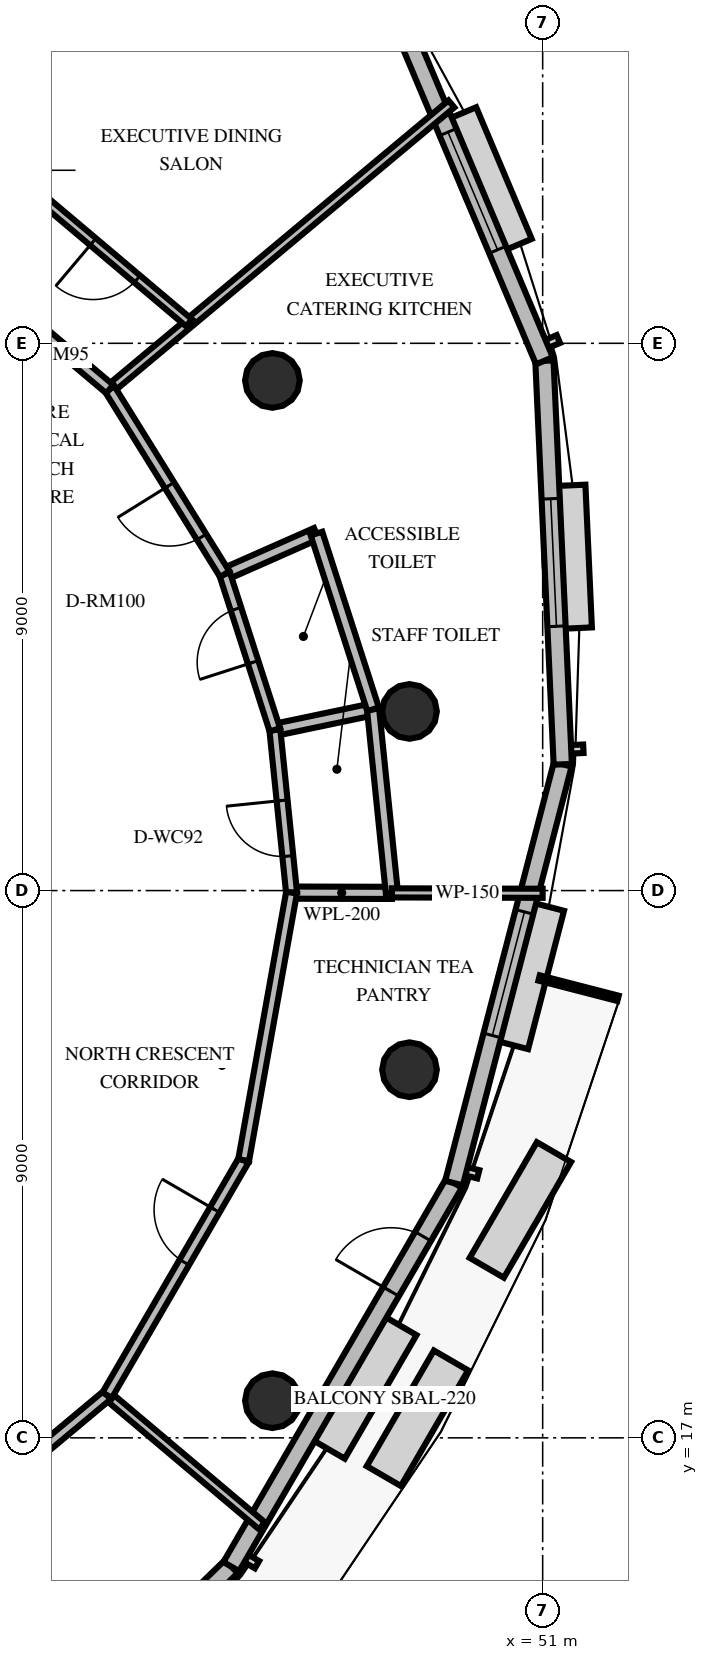
"""IFC4 building model, lengths in metres.
Left out: names, types, materials, properties, quantities, classifications, styles, units other than length and angle.
Written with IfcOpenShell. Run it as: python <this file> out.ifc"""

import sys

from ifc_helpers import new_model, si_unit, direction, frame, frame_2d, origin, origin_2d, place, context, subcontext, project, spatial, rectangle, circle, extrude, element, fill, save


model = new_model("IFC4")
c1 = context("Model", 3, precision=1e-05, world=origin(), true_north=direction((0.0, 1.0)))
c2 = subcontext(c1, "Body", "Model", "MODEL_VIEW")
j1 = project(units=[si_unit("LENGTHUNIT", "METRE"), si_unit("PLANEANGLEUNIT", "RADIAN")], contexts=[c1])
p1 = place(None, origin())
s1 = spatial("IfcSite", under=j1, at=p1, CompositionType="ELEMENT")
p2 = place(p1, origin())
s2 = spatial("IfcBuilding", under=s1, at=p2, CompositionType="ELEMENT")
p3 = place(p2, frame((0.0, 0.0, 277.2)))
s3 = spatial("IfcBuildingStorey", under=s2, at=p3, CompositionType="ELEMENT", Elevation=277.2)
for number, where, z_axis, x_axis in (
    (1, (48.81, 28.946, 0.0), (0.0, 0.0, 1.0), (1.0, 0.0, 0.0)),
    (2, (46.555, 34.389, 0.0), (0.0, 0.0, 1.0), (1.0, 0.0, 0.0)),
    (3, (46.555, 17.611, 0.0), (0.0, 0.0, 1.0), (1.0, 0.0, 0.0)),
    (4, (48.81, 23.054, 0.0), (0.0, 0.0, 1.0), (1.0, 0.0, 0.0)),
):
    element("IfcColumn", number, at=place(p3, frame(where, z_axis=z_axis, x_axis=x_axis)), inside=s3, PredefinedType="COLUMN", context=c2, shape_type="SweptSolid", body=[
        extrude(circle(Radius=0.45, at=origin_2d()), origin(), (0.0, 0.0, 1.0), 3.6),
    ])
p4 = place(p3, frame((40.783, 9.917, 0.0), z_axis=(0.0, 0.0, 1.0), x_axis=(0.716208919205, 0.697885939142, 0.0)))
e5 = element("IfcWall", 5, at=p4, inside=s3, PredefinedType="SOLIDWALL", context=c2, shape_type="SweptSolid", body=[
    extrude(rectangle(XDim=7.115, YDim=0.3, at=frame_2d((3.558, 0.0))), origin(), (0.0, 0.0, 1.0), 2.76),
])
p5 = place(p4, frame((2.508, 0.0, 0.8)))
e6 = element("IfcOpeningElement", 6, at=p5, cuts=e5, PredefinedType="OPENING", context=c2, shape_type="SweptSolid", body=[
    extrude(rectangle(XDim=2.1, YDim=1.85, at=frame_2d((1.05, 0.925))), frame((0.0, 0.16, 0.0), z_axis=(0.0, -1.0, 0.0), x_axis=(1.0, 0.0, 0.0)), (0.0, 0.0, 1.0), 0.32),
])
p6 = place(p3, frame((45.879, 14.883, 0.0), z_axis=(0.0, 0.0, 1.0), x_axis=(0.502255031748, 0.864719540131, 0.0)))
e7 = element("IfcWall", 7, at=p6, inside=s3, PredefinedType="SOLIDWALL", context=c2, shape_type="SweptSolid", body=[
    extrude(rectangle(XDim=7.293, YDim=0.3, at=frame_2d((3.646, 0.0))), origin(), (0.0, 0.0, 1.0), 2.76),
])
p7 = place(p6, frame((5.23, 0.0, 0.0)))
e8 = element("IfcOpeningElement", 8, at=p7, cuts=e7, PredefinedType="OPENING", context=c2, shape_type="SweptSolid", body=[
    extrude(rectangle(XDim=1.05, YDim=2.15, at=frame_2d((0.525, 1.075))), frame((0.0, 0.16, 0.0), z_axis=(0.0, -1.0, 0.0), x_axis=(1.0, 0.0, 0.0)), (0.0, 0.0, 1.0), 0.32),
])
p8 = place(p3, frame((49.542, 21.19, 0.0), z_axis=(0.0, 0.0, 1.0), x_axis=(0.251374151945, 0.967889991546, 0.0)))
e9 = element("IfcWall", 9, at=p8, inside=s3, PredefinedType="SOLIDWALL", context=c2, shape_type="SweptSolid", body=[
    extrude(rectangle(XDim=7.115, YDim=0.3, at=frame_2d((3.558, 0.0))), origin(), (0.0, 0.0, 1.0), 2.76),
])
p9 = place(p8, frame((2.508, 0.0, 0.8)))
e10 = element("IfcOpeningElement", 10, at=p9, cuts=e9, PredefinedType="OPENING", context=c2, shape_type="SweptSolid", body=[
    extrude(rectangle(XDim=2.1, YDim=1.85, at=frame_2d((1.05, 0.925))), frame((0.0, 0.16, 0.0), z_axis=(0.0, -1.0, 0.0), x_axis=(1.0, 0.0, 0.0)), (0.0, 0.0, 1.0), 0.32),
])
p10 = place(p3, frame((51.331, 28.076, 0.0), z_axis=(0.0, 0.0, 1.0), x_axis=(-0.045424331504, 0.998967782317, 0.0)))
e11 = element("IfcWall", 11, at=p10, inside=s3, PredefinedType="SOLIDWALL", context=c2, shape_type="SweptSolid", body=[
    extrude(rectangle(XDim=6.643, YDim=0.3, at=frame_2d((3.322, 0.0))), origin(), (0.0, 0.0, 1.0), 2.76),
])
p11 = place(p10, frame((2.272, 0.0, 0.8)))
e12 = element("IfcOpeningElement", 12, at=p11, cuts=e11, PredefinedType="OPENING", context=c2, shape_type="SweptSolid", body=[
    extrude(rectangle(XDim=2.1, YDim=1.85, at=frame_2d((1.05, 0.925))), frame((0.0, 0.16, 0.0), z_axis=(0.0, -1.0, 0.0), x_axis=(1.0, 0.0, 0.0)), (0.0, 0.0, 1.0), 0.32),
])
p12 = place(p3, frame((51.029, 34.713, 0.0), z_axis=(0.0, 0.0, 1.0), x_axis=(-0.388609687406, 0.921402469529, 0.0)))
e13 = element("IfcWall", 13, at=p12, inside=s3, PredefinedType="SOLIDWALL", context=c2, shape_type="SweptSolid", body=[
    extrude(rectangle(XDim=6.062, YDim=0.3, at=frame_2d((3.031, 0.0))), origin(), (0.0, 0.0, 1.0), 2.76),
])
p13 = place(p12, frame((1.981, 0.0, 0.8)))
e14 = element("IfcOpeningElement", 14, at=p13, cuts=e13, PredefinedType="OPENING", context=c2, shape_type="SweptSolid", body=[
    extrude(rectangle(XDim=2.1, YDim=1.85, at=frame_2d((1.05, 0.925))), frame((0.0, 0.16, 0.0), z_axis=(0.0, -1.0, 0.0), x_axis=(1.0, 0.0, 0.0)), (0.0, 0.0, 1.0), 0.32),
])
p14 = place(p3, frame((46.87, 25.966, 0.0), z_axis=(0.0, 0.0, 1.0), x_axis=(0.999996452876, -0.002663500466, 0.0)))
e15 = element("IfcWall", 15, at=p14, inside=s3, PredefinedType="PLUMBINGWALL", context=c2, shape_type="SweptSolid", body=[
    extrude(rectangle(XDim=1.65, YDim=0.2, at=frame_2d((0.825, 0.0))), origin(), (0.0, 0.0, 1.0), 2.46),
])
p15 = place(p3, frame((46.596, 28.643, 0.0), z_axis=(0.0, 0.0, 1.0), x_axis=(0.978687703769, 0.20535427556, 0.0)))
e16 = element("IfcWall", 16, at=p15, inside=s3, PredefinedType="PLUMBINGWALL", context=c2, shape_type="SweptSolid", body=[
    extrude(rectangle(XDim=1.65, YDim=0.2, at=frame_2d((0.825, 0.0))), origin(), (0.0, 0.0, 1.0), 2.46),
])
p16 = place(p3, frame((48.52, 25.962, 0.0), z_axis=(0.0, 0.0, 1.0), x_axis=(-0.101900297464, 0.994794616681, 0.0)))
e17 = element("IfcWall", 17, at=p16, inside=s3, PredefinedType="PLUMBINGWALL", context=c2, shape_type="SweptSolid", body=[
    extrude(rectangle(XDim=3.036, YDim=0.2, at=frame_2d((1.518, 0.0))), origin(), (0.0, 0.0, 1.0), 2.46),
])
p17 = place(p3, frame((46.87, 25.966, 0.0), z_axis=(0.0, 0.0, 1.0), x_axis=(-0.101992026191, 0.994785216312, 0.0)))
e18 = element("IfcWall", 18, at=p17, inside=s3, PredefinedType="PARTITIONING", context=c2, shape_type="SweptSolid", body=[
    extrude(rectangle(XDim=2.69, YDim=0.18, at=frame_2d((1.345, 0.0))), origin(), (0.0, 0.0, 1.0), 2.46),
])
p18 = place(p17, frame((0.603, 0.0, 0.0)))
e19 = element("IfcOpeningElement", 19, at=p18, cuts=e18, PredefinedType="OPENING", context=c2, shape_type="SweptSolid", body=[
    extrude(rectangle(XDim=0.92, YDim=2.1, at=frame_2d((0.46, 1.05))), frame((0.0, 0.1, 0.0), z_axis=(0.0, -1.0, 0.0), x_axis=(1.0, 0.0, 0.0)), (0.0, 0.0, 1.0), 0.2),
])
p19 = place(p3, frame((45.771, 31.204, 0.0), z_axis=(0.0, 0.0, 1.0), x_axis=(0.914584805852, 0.404394155378, 0.0)))
e20 = element("IfcWall", 20, at=p19, inside=s3, PredefinedType="PLUMBINGWALL", context=c2, shape_type="SweptSolid", body=[
    extrude(rectangle(XDim=1.65, YDim=0.2, at=frame_2d((0.825, 0.0))), origin(), (0.0, 0.0, 1.0), 2.46),
])
p20 = place(p3, frame((48.211, 28.982, 0.0), z_axis=(0.0, 0.0, 1.0), x_axis=(-0.306584473664, 0.951843453782, 0.0)))
e21 = element("IfcWall", 21, at=p20, inside=s3, PredefinedType="PLUMBINGWALL", context=c2, shape_type="SweptSolid", body=[
    extrude(rectangle(XDim=3.036, YDim=0.2, at=frame_2d((1.518, 0.0))), origin(), (0.0, 0.0, 1.0), 2.46),
])
p21 = place(p3, frame((46.596, 28.643, 0.0), z_axis=(0.0, 0.0, 1.0), x_axis=(-0.306520218398, 0.951864147719, 0.0)))
e22 = element("IfcWall", 22, at=p21, inside=s3, PredefinedType="PARTITIONING", context=c2, shape_type="SweptSolid", body=[
    extrude(rectangle(XDim=2.69, YDim=0.18, at=frame_2d((1.345, 0.0))), origin(), (0.0, 0.0, 1.0), 2.46),
])
p22 = place(p21, frame((1.167, 0.0, 0.0)))
e23 = element("IfcOpeningElement", 23, at=p22, cuts=e22, PredefinedType="OPENING", context=c2, shape_type="SweptSolid", body=[
    extrude(rectangle(XDim=0.92, YDim=2.1, at=frame_2d((0.46, 1.05))), frame((0.0, 0.1, 0.0), z_axis=(0.0, -1.0, 0.0), x_axis=(1.0, 0.0, 0.0)), (0.0, 0.0, 1.0), 0.2),
])
p23 = place(p3, frame((48.52, 25.962, 0.0), z_axis=(0.0, 0.0, 1.0), x_axis=(0.9999967237, -0.002559802581, 0.0)))
e24 = element("IfcWall", 24, at=p23, inside=s3, PredefinedType="PARTITIONING", context=c2, shape_type="SweptSolid", body=[
    extrude(rectangle(XDim=2.48, YDim=0.15, at=frame_2d((1.24, 0.0))), origin(), (0.0, 0.0, 1.0), 2.46),
])
p24 = place(p3, frame((43.881, 34.247, 0.0), z_axis=(0.0, 0.0, 1.0), x_axis=(0.767720640374, 0.640784689536, 0.0)))
e25 = element("IfcWall", 25, at=p24, inside=s3, PredefinedType="PARTITIONING", context=c2, shape_type="SweptSolid", body=[
    extrude(rectangle(XDim=7.318, YDim=0.15, at=frame_2d((3.659, 0.0))), origin(), (0.0, 0.0, 1.0), 2.46),
])
p25 = place(p3, frame((45.771, 31.204, 0.0), z_axis=(0.0, 0.0, 1.0), x_axis=(-0.527693632299, 0.849434771145, 0.0)))
e26 = element("IfcWall", 26, at=p25, inside=s3, PredefinedType="PARTITIONING", context=c2, shape_type="SweptSolid", body=[
    extrude(rectangle(XDim=3.582, YDim=0.18, at=frame_2d((1.791, 0.0))), origin(), (0.0, 0.0, 1.0), 2.46),
])
p26 = place(p25, frame((0.721, 0.0, 0.0)))
e27 = element("IfcOpeningElement", 27, at=p26, cuts=e26, PredefinedType="OPENING", context=c2, shape_type="SweptSolid", body=[
    extrude(rectangle(XDim=1.0, YDim=2.15, at=frame_2d((0.5, 1.075))), frame((0.0, 0.1, 0.0), z_axis=(0.0, -1.0, 0.0), x_axis=(1.0, 0.0, 0.0)), (0.0, 0.0, 1.0), 0.2),
])
p27 = place(p3, frame((43.881, 34.247, 0.0), z_axis=(0.0, 0.0, 1.0), x_axis=(-0.764357098744, 0.644793164976, 0.0)))
e28 = element("IfcWall", 28, at=p27, inside=s3, PredefinedType="PARTITIONING", context=c2, shape_type="SweptSolid", body=[
    extrude(rectangle(XDim=4.47, YDim=0.18, at=frame_2d((2.235, 0.0))), origin(), (0.0, 0.0, 1.0), 2.46),
])
p28 = place(p3, frame((45.186, 35.336, 0.0), z_axis=(0.0, 0.0, 1.0), x_axis=(-0.764355389284, 0.644795191415, 0.0)))
e29 = element("IfcWall", 29, at=p28, inside=s3, PredefinedType="PARTITIONING", context=c2, shape_type="SweptSolid", body=[
    extrude(rectangle(XDim=5.06, YDim=0.15, at=frame_2d((2.53, 0.0))), origin(), (0.0, 0.0, 1.0), 2.46),
])
p29 = place(p28, frame((1.117, 0.0, 0.0)))
e30 = element("IfcOpeningElement", 30, at=p29, cuts=e29, PredefinedType="OPENING", context=c2, shape_type="SweptSolid", body=[
    extrude(rectangle(XDim=0.95, YDim=2.15, at=frame_2d((0.475, 1.075))), frame((0.0, 0.085, 0.0), z_axis=(0.0, -1.0, 0.0), x_axis=(1.0, 0.0, 0.0)), (0.0, 0.0, 1.0), 0.17),
])
p30 = place(p3, frame((43.837, 17.701, 0.0), z_axis=(0.0, 0.0, 1.0), x_axis=(0.764350185537, -0.644801360009, 0.0)))
e31 = element("IfcWall", 31, at=p30, inside=s3, PredefinedType="PARTITIONING", context=c2, shape_type="SweptSolid", body=[
    extrude(rectangle(XDim=3.331, YDim=0.15, at=frame_2d((1.666, 0.0))), origin(), (0.0, 0.0, 1.0), 2.46),
])
p31 = place(p3, frame((40.406, 14.837, 0.0), z_axis=(0.0, 0.0, 1.0), x_axis=(0.767746496496, 0.640753710187, 0.0)))
e32 = element("IfcWall", 32, at=p31, inside=s3, PredefinedType="PARTITIONING", context=c2, shape_type="SweptSolid", body=[
    extrude(rectangle(XDim=4.47, YDim=0.18, at=frame_2d((2.235, 0.0))), origin(), (0.0, 0.0, 1.0), 2.46),
])
p32 = place(p3, frame((43.837, 17.701, 0.0), z_axis=(0.0, 0.0, 1.0), x_axis=(0.502226433787, 0.864736150051, 0.0)))
e33 = element("IfcWall", 33, at=p32, inside=s3, PredefinedType="PARTITIONING", context=c2, shape_type="SweptSolid", body=[
    extrude(rectangle(XDim=4.47, YDim=0.18, at=frame_2d((2.235, 0.0))), origin(), (0.0, 0.0, 1.0), 2.46),
])
p33 = place(p32, frame((2.527, 0.0, 0.0)))
e34 = element("IfcOpeningElement", 34, at=p33, cuts=e33, PredefinedType="OPENING", context=c2, shape_type="SweptSolid", body=[
    extrude(rectangle(XDim=1.0, YDim=2.15, at=frame_2d((0.5, 1.075))), frame((0.0, 0.1, 0.0), z_axis=(0.0, -1.0, 0.0), x_axis=(1.0, 0.0, 0.0)), (0.0, 0.0, 1.0), 0.2),
])
p34 = place(p3, frame((46.082, 21.567, 0.0), z_axis=(0.0, 0.0, 1.0), x_axis=(0.176265133865, 0.98434272618, 0.0)))
e35 = element("IfcWall", 35, at=p34, inside=s3, PredefinedType="PARTITIONING", context=c2, shape_type="SweptSolid", body=[
    extrude(rectangle(XDim=4.47, YDim=0.18, at=frame_2d((2.235, 0.0))), origin(), (0.0, 0.0, 1.0), 2.46),
])
p35 = place(p7, origin())
e36 = element("IfcDoor", 36, at=p35, inside=s3, OperationType="SINGLE_SWING_LEFT", PredefinedType="DOOR", context=c2, shape_type="SweptSolid", body=[
    extrude(rectangle(XDim=1.05, YDim=2.15, at=frame_2d((0.525, 1.075))), frame((0.0, 0.025, 0.0), z_axis=(0.0, -1.0, 0.0), x_axis=(1.0, 0.0, 0.0)), (0.0, 0.0, 1.0), 0.05),
])
fill(e8, e36)
p36 = place(p9, origin())
e37 = element("IfcWindow", 37, at=p36, inside=s3, PartitioningType="SINGLE_PANEL", PredefinedType="WINDOW", context=c2, shape_type="SweptSolid", body=[
    extrude(rectangle(XDim=2.1, YDim=1.85, at=frame_2d((1.05, 0.925))), frame((0.0, 0.03, 0.0), z_axis=(0.0, -1.0, 0.0), x_axis=(1.0, 0.0, 0.0)), (0.0, 0.0, 1.0), 0.06),
])
fill(e10, e37)
p37 = place(p11, origin())
e38 = element("IfcWindow", 38, at=p37, inside=s3, PartitioningType="SINGLE_PANEL", PredefinedType="WINDOW", context=c2, shape_type="SweptSolid", body=[
    extrude(rectangle(XDim=2.1, YDim=1.85, at=frame_2d((1.05, 0.925))), frame((0.0, 0.03, 0.0), z_axis=(0.0, -1.0, 0.0), x_axis=(1.0, 0.0, 0.0)), (0.0, 0.0, 1.0), 0.06),
])
fill(e12, e38)
p38 = place(p13, origin())
e39 = element("IfcWindow", 39, at=p38, inside=s3, PartitioningType="SINGLE_PANEL", PredefinedType="WINDOW", context=c2, shape_type="SweptSolid", body=[
    extrude(rectangle(XDim=2.1, YDim=1.85, at=frame_2d((1.05, 0.925))), frame((0.0, 0.03, 0.0), z_axis=(0.0, -1.0, 0.0), x_axis=(1.0, 0.0, 0.0)), (0.0, 0.0, 1.0), 0.06),
])
fill(e14, e39)
p39 = place(p18, origin())
e40 = element("IfcDoor", 40, at=p39, inside=s3, OperationType="SINGLE_SWING_RIGHT", PredefinedType="DOOR", context=c2, shape_type="SweptSolid", body=[
    extrude(rectangle(XDim=0.92, YDim=2.1, at=frame_2d((0.46, 1.05))), frame((0.0, 0.025, 0.0), z_axis=(0.0, -1.0, 0.0), x_axis=(1.0, 0.0, 0.0)), (0.0, 0.0, 1.0), 0.05),
])
fill(e19, e40)
p40 = place(p22, origin())
e41 = element("IfcDoor", 41, at=p40, inside=s3, OperationType="SINGLE_SWING_LEFT", PredefinedType="DOOR", context=c2, shape_type="SweptSolid", body=[
    extrude(rectangle(XDim=0.92, YDim=2.1, at=frame_2d((0.46, 1.05))), frame((0.0, 0.025, 0.0), z_axis=(0.0, -1.0, 0.0), x_axis=(1.0, 0.0, 0.0)), (0.0, 0.0, 1.0), 0.05),
])
fill(e23, e41)
p41 = place(p26, origin())
e42 = element("IfcDoor", 42, at=p41, inside=s3, OperationType="SINGLE_SWING_RIGHT", PredefinedType="DOOR", context=c2, shape_type="SweptSolid", body=[
    extrude(rectangle(XDim=1.0, YDim=2.15, at=frame_2d((0.5, 1.075))), frame((0.0, 0.025, 0.0), z_axis=(0.0, -1.0, 0.0), x_axis=(1.0, 0.0, 0.0)), (0.0, 0.0, 1.0), 0.05),
])
fill(e27, e42)
p42 = place(p29, origin())
e43 = element("IfcDoor", 43, at=p42, inside=s3, OperationType="SINGLE_SWING_RIGHT", PredefinedType="DOOR", context=c2, shape_type="SweptSolid", body=[
    extrude(rectangle(XDim=0.95, YDim=2.15, at=frame_2d((0.475, 1.075))), frame((0.0, 0.025, 0.0), z_axis=(0.0, -1.0, 0.0), x_axis=(1.0, 0.0, 0.0)), (0.0, 0.0, 1.0), 0.05),
])
fill(e30, e43)
p43 = place(p33, origin())
e44 = element("IfcDoor", 44, at=p43, inside=s3, OperationType="SINGLE_SWING_RIGHT", PredefinedType="DOOR", context=c2, shape_type="SweptSolid", body=[
    extrude(rectangle(XDim=1.0, YDim=2.15, at=frame_2d((0.5, 1.075))), frame((0.0, 0.025, 0.0), z_axis=(0.0, -1.0, 0.0), x_axis=(1.0, 0.0, 0.0)), (0.0, 0.0, 1.0), 0.05),
])
fill(e34, e44)
save(model, sys.argv[1])
